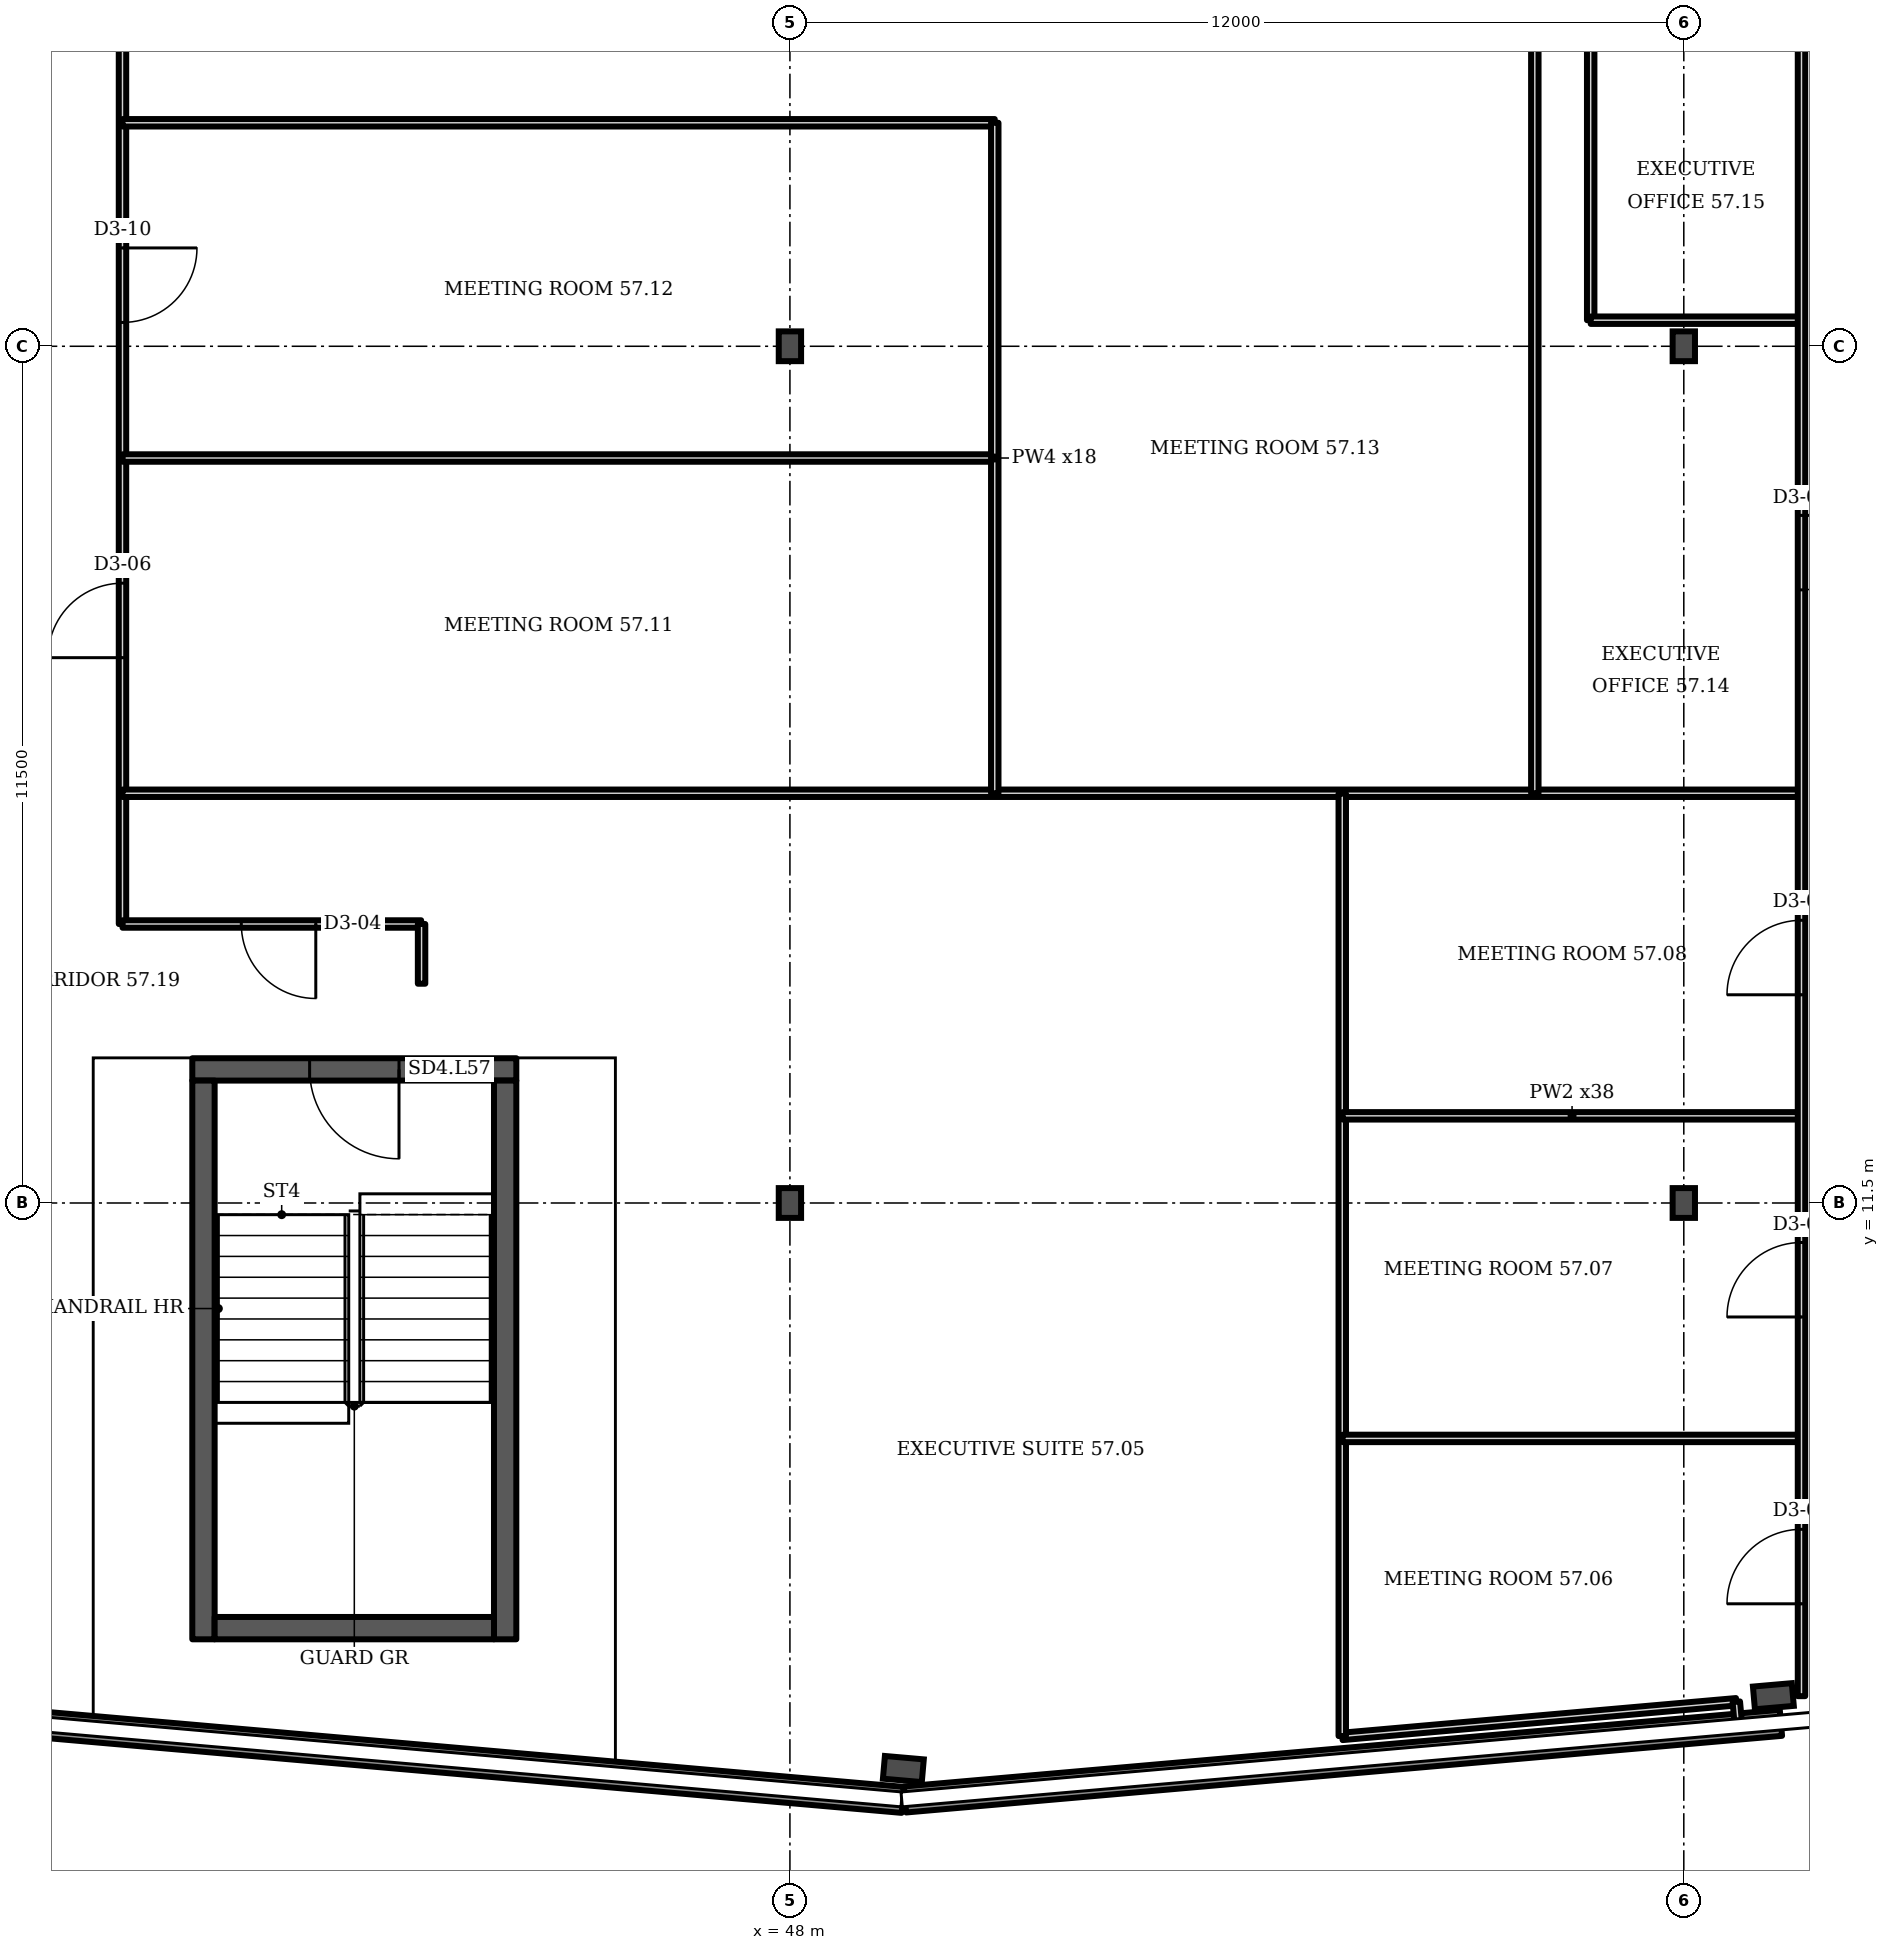
"""IFC4 building model, lengths in metres.
Left out: names, types, materials, properties, quantities, classifications, styles, units other than length and angle.
Written with IfcOpenShell. Run it as: python <this file> out.ifc"""

import sys

from ifc_helpers import new_model, si_unit, direction, frame, frame_2d, origin, origin_2d, place, context, subcontext, project, spatial, rectangle, i_section, extrude, element, fill, save


model = new_model("IFC4")
c1 = context("Model", 3, precision=1e-05, world=origin(), true_north=direction((0.0, 1.0)))
c2 = subcontext(c1, "Body", "Model", "MODEL_VIEW")
j1 = project(units=[si_unit("LENGTHUNIT", "METRE"), si_unit("PLANEANGLEUNIT", "RADIAN")], contexts=[c1])
p1 = place(None, origin())
s1 = spatial("IfcSite", under=j1, at=p1, CompositionType="ELEMENT")
p2 = place(p1, origin())
s2 = spatial("IfcBuilding", under=s1, at=p2, CompositionType="ELEMENT")
p3 = place(p2, frame((0.0, 0.0, 228.7)))
s3 = spatial("IfcBuildingStorey", under=s2, at=p3, CompositionType="ELEMENT", Elevation=228.7)
for number, where, z_axis, x_axis in (
    (1, (49.523, 3.902, 0.0), (0.0, 0.0, 1.0), (-0.087, -0.996, 0.0)),
    (2, (61.202, 4.879, 0.0), (0.0, 0.0, 1.0), (0.087, -0.996, 0.0)),
):
    element("IfcColumn", number, at=place(p3, frame(where, z_axis=z_axis, x_axis=x_axis)), inside=s3, PredefinedType="COLUMN", context=c2, shape_type="SweptSolid", body=[
        extrude(i_section(OverallWidth=0.306, OverallDepth=0.524, WebThickness=0.021, FlangeThickness=0.04, FilletRadius=0.027, at=origin_2d()), origin(), (0.0, 0.0, 1.0), 3.6),
    ])
for number, where, z_axis, x_axis in (
    (3, (48.0, 11.5, 0.0), (0.0, 0.0, 1.0), (1.0, 0.0, 0.0)),
    (4, (60.0, 11.5, 0.0), (0.0, 0.0, 1.0), (1.0, 0.0, 0.0)),
    (5, (48.0, 23.0, 0.0), (0.0, 0.0, 1.0), (1.0, 0.0, 0.0)),
    (6, (60.0, 23.0, 0.0), (0.0, 0.0, 1.0), (1.0, 0.0, 0.0)),
):
    element("IfcColumn", number, at=place(p3, frame(where, z_axis=z_axis, x_axis=x_axis)), inside=s3, PredefinedType="COLUMN", context=c2, shape_type="SweptSolid", body=[
        extrude(i_section(OverallWidth=0.3, OverallDepth=0.4, WebThickness=0.013, FlangeThickness=0.024, FilletRadius=0.027, at=origin_2d()), origin(), (0.0, 0.0, 1.0), 3.6),
    ])
p4 = place(p3, frame((37.729, 4.519, 0.0), z_axis=(0.0, 0.0, 1.0), x_axis=(0.99619, -0.087167, 0.0)))
e7 = element("IfcWall", 7, at=p4, inside=s3, PredefinedType="SOLIDWALL", context=c2, shape_type="SweptSolid", body=[
    extrude(rectangle(XDim=11.831, YDim=0.35, at=frame_2d((5.915, 0.0))), origin(), (0.0, 0.0, 1.0), 1.0),
])
p5 = place(p3, frame((49.545, 3.493, 0.0), z_axis=(0.0, 0.0, 1.0), x_axis=(0.996196, 0.087141, 0.0)))
e8 = element("IfcWall", 8, at=p5, inside=s3, PredefinedType="SOLIDWALL", context=c2, shape_type="SweptSolid", body=[
    extrude(rectangle(XDim=11.803, YDim=0.35, at=frame_2d((5.902, 0.0))), origin(), (0.0, 0.0, 1.0), 1.0),
])
p6 = place(p3, frame((39.977, 13.293, 0.0), z_axis=(0.0, 0.0, 1.0), x_axis=(1.0, 0.0, 0.0)))
e9 = element("IfcWall", 9, at=p6, inside=s3, PredefinedType="SHEAR", context=c2, shape_type="SweptSolid", body=[
    extrude(rectangle(XDim=4.35, YDim=0.3, at=frame_2d((2.175, 0.0))), origin(), (0.0, 0.0, 1.0), 3.2),
])
p7 = place(p6, frame((1.575, 0.0, 0.0)))
e10 = element("IfcOpeningElement", 10, at=p7, cuts=e9, PredefinedType="OPENING", context=c2, shape_type="SweptSolid", body=[
    extrude(rectangle(XDim=1.2, YDim=2.1, at=frame_2d((0.6, 1.05))), frame((0.0, 0.16, 0.0), z_axis=(0.0, -1.0, 0.0), x_axis=(1.0, 0.0, 0.0)), (0.0, 0.0, 1.0), 0.32),
])
p8 = place(p3, frame((39.04, 15.245, 0.0), z_axis=(0.0, 0.0, 1.0), x_axis=(0.0, 1.0, 0.0)))
e11 = element("IfcWall", 11, at=p8, inside=s3, PredefinedType="PARTITIONING", context=c2, shape_type="SweptSolid", body=[
    extrude(rectangle(XDim=15.255, YDim=0.1, at=frame_2d((7.627, 0.0))), origin(), (0.0, 0.0, 1.0), 3.2),
])
p9 = place(p8, frame((3.575, 0.0, 0.0)))
e12 = element("IfcOpeningElement", 12, at=p9, cuts=e11, PredefinedType="OPENING", context=c2, shape_type="SweptSolid", body=[
    extrude(rectangle(XDim=1.0, YDim=2.1, at=frame_2d((0.5, 1.05))), frame((0.0, 0.06, 0.0), z_axis=(0.0, -1.0, 0.0), x_axis=(1.0, 0.0, 0.0)), (0.0, 0.0, 1.0), 0.12),
])
p10 = place(p8, frame((8.075, 0.0, 0.0)))
e13 = element("IfcOpeningElement", 13, at=p10, cuts=e11, PredefinedType="OPENING", context=c2, shape_type="SweptSolid", body=[
    extrude(rectangle(XDim=1.0, YDim=2.1, at=frame_2d((0.5, 1.05))), frame((0.0, 0.06, 0.0), z_axis=(0.0, -1.0, 0.0), x_axis=(1.0, 0.0, 0.0)), (0.0, 0.0, 1.0), 0.12),
])
p11 = place(p3, frame((39.04, 15.245, 0.0), z_axis=(0.0, 0.0, 1.0), x_axis=(1.0, 0.0, 0.0)))
e14 = element("IfcWall", 14, at=p11, inside=s3, PredefinedType="PARTITIONING", context=c2, shape_type="SweptSolid", body=[
    extrude(rectangle(XDim=4.01, YDim=0.1, at=frame_2d((2.005, 0.0))), origin(), (0.0, 0.0, 1.0), 3.2),
])
p12 = place(p11, frame((1.595, 0.0, 0.0)))
e15 = element("IfcOpeningElement", 15, at=p12, cuts=e14, PredefinedType="OPENING", context=c2, shape_type="SweptSolid", body=[
    extrude(rectangle(XDim=1.0, YDim=2.1, at=frame_2d((0.5, 1.05))), frame((0.0, 0.06, 0.0), z_axis=(0.0, -1.0, 0.0), x_axis=(1.0, 0.0, 0.0)), (0.0, 0.0, 1.0), 0.12),
])
p13 = place(p3, frame((39.04, 17.0, 0.0), z_axis=(0.0, 0.0, 1.0), x_axis=(1.0, 0.0, 0.0)))
e16 = element("IfcWall", 16, at=p13, inside=s3, PredefinedType="PARTITIONING", context=c2, shape_type="SweptSolid", body=[
    extrude(rectangle(XDim=22.54, YDim=0.1, at=frame_2d((11.27, 0.0))), origin(), (0.0, 0.0, 1.0), 3.2),
])
for number, where, z_axis, x_axis in (
    (17, (39.04, 21.5, 0.0), (0.0, 0.0, 1.0), (1.0, 0.0, 0.0)),
    (18, (39.04, 26.0, 0.0), (0.0, 0.0, 1.0), (1.0, 0.0, 0.0)),
):
    element("IfcWall", number, at=place(p3, frame(where, z_axis=z_axis, x_axis=x_axis)), inside=s3, PredefinedType="PARTITIONING", context=c2, shape_type="SweptSolid", body=[
        extrude(rectangle(XDim=11.71, YDim=0.1, at=frame_2d((5.855, 0.0))), origin(), (0.0, 0.0, 1.0), 3.2),
    ])
p14 = place(p3, frame((43.055, 14.443, 0.0), z_axis=(0.0, 0.0, 1.0), x_axis=(0.0, 1.0, 0.0)))
e19 = element("IfcWall", 19, at=p14, inside=s3, PredefinedType="PARTITIONING", context=c2, shape_type="SweptSolid", body=[
    extrude(rectangle(XDim=0.802, YDim=0.1, at=frame_2d((0.401, 0.0))), origin(), (0.0, 0.0, 1.0), 3.2),
])
p15 = place(p3, frame((50.75, 17.0, 0.0), z_axis=(0.0, 0.0, 1.0), x_axis=(0.0, 1.0, 0.0)))
e20 = element("IfcWall", 20, at=p15, inside=s3, PredefinedType="PARTITIONING", context=c2, shape_type="SweptSolid", body=[
    extrude(rectangle(XDim=9.0, YDim=0.1, at=frame_2d((4.5, 0.0))), origin(), (0.0, 0.0, 1.0), 3.2),
])
p16 = place(p3, frame((55.415, 4.34, 0.0), z_axis=(0.0, 0.0, 1.0), x_axis=(0.996159, 0.087534, 0.0)))
e21 = element("IfcWall", 21, at=p16, inside=s3, PredefinedType="PARTITIONING", context=c2, shape_type="SweptSolid", body=[
    extrude(rectangle(XDim=5.31, YDim=0.1, at=frame_2d((2.655, 0.0))), origin(), (0.0, 0.0, 1.0), 2.58),
])
p17 = place(p3, frame((55.415, 4.345, 0.0), z_axis=(0.0, 0.0, 1.0), x_axis=(0.0, 1.0, 0.0)))
e22 = element("IfcWall", 22, at=p17, inside=s3, PredefinedType="PARTITIONING", context=c2, shape_type="SweptSolid", body=[
    extrude(rectangle(XDim=12.65, YDim=0.1, at=frame_2d((6.325, 0.0))), origin(), (0.0, 0.0, 1.0), 3.2),
])
for number, where, z_axis, x_axis in (
    (23, (55.42, 8.34, 0.0), (0.0, 0.0, 1.0), (1.0, 0.0, 0.0)),
    (24, (55.42, 12.67, 0.0), (0.0, 0.0, 1.0), (1.0, 0.0, 0.0)),
):
    element("IfcWall", number, at=place(p3, frame(where, z_axis=z_axis, x_axis=x_axis)), inside=s3, PredefinedType="PARTITIONING", context=c2, shape_type="SweptSolid", body=[
        extrude(rectangle(XDim=6.16, YDim=0.1, at=frame_2d((3.08, 0.0))), origin(), (0.0, 0.0, 1.0), 3.2),
    ])
p18 = place(p3, frame((58.0, 17.0, 0.0), z_axis=(0.0, 0.0, 1.0), x_axis=(0.0, 1.0, 0.0)))
e25 = element("IfcWall", 25, at=p18, inside=s3, PredefinedType="PARTITIONING", context=c2, shape_type="SweptSolid", body=[
    extrude(rectangle(XDim=13.5, YDim=0.1, at=frame_2d((6.75, 0.0))), origin(), (0.0, 0.0, 1.0), 3.2),
])
p19 = place(p3, frame((58.75, 23.35, 0.0), z_axis=(0.0, 0.0, 1.0), x_axis=(0.0, 1.0, 0.0)))
e26 = element("IfcWall", 26, at=p19, inside=s3, PredefinedType="PARTITIONING", context=c2, shape_type="SweptSolid", body=[
    extrude(rectangle(XDim=6.35, YDim=0.1, at=frame_2d((3.175, 0.0))), origin(), (0.0, 0.0, 1.0), 3.2),
])
p20 = place(p3, frame((58.75, 23.35, 0.0), z_axis=(0.0, 0.0, 1.0), x_axis=(1.0, 0.0, 0.0)))
e27 = element("IfcWall", 27, at=p20, inside=s3, PredefinedType="PARTITIONING", context=c2, shape_type="SweptSolid", body=[
    extrude(rectangle(XDim=2.83, YDim=0.1, at=frame_2d((1.415, 0.0))), origin(), (0.0, 0.0, 1.0), 3.2),
])
p21 = place(p3, frame((60.733, 4.497, 0.0), z_axis=(0.0, 0.0, 1.0), x_axis=(-0.090037, 0.995936, 0.0)))
e28 = element("IfcWall", 28, at=p21, inside=s3, PredefinedType="PARTITIONING", context=c2, shape_type="SweptSolid", body=[
    extrude(rectangle(XDim=0.309, YDim=0.1, at=frame_2d((0.155, 0.0))), origin(), (0.0, 0.0, 1.0), 3.2),
])
p22 = place(p3, frame((61.58, 4.88, 0.0), z_axis=(0.0, 0.0, 1.0), x_axis=(0.0, 1.0, 0.0)))
e29 = element("IfcWall", 29, at=p22, inside=s3, PredefinedType="PARTITIONING", context=c2, shape_type="SweptSolid", body=[
    extrude(rectangle(XDim=24.82, YDim=0.1, at=frame_2d((12.41, 0.0))), origin(), (0.0, 0.0, 1.0), 3.2),
])
p23 = place(p22, frame((1.24, 0.0, 0.0)))
e30 = element("IfcOpeningElement", 30, at=p23, cuts=e29, PredefinedType="OPENING", context=c2, shape_type="SweptSolid", body=[
    extrude(rectangle(XDim=1.0, YDim=2.1, at=frame_2d((0.5, 1.05))), frame((0.0, 0.06, 0.0), z_axis=(0.0, -1.0, 0.0), x_axis=(1.0, 0.0, 0.0)), (0.0, 0.0, 1.0), 0.12),
])
p24 = place(p22, frame((5.09, 0.0, 0.0)))
e31 = element("IfcOpeningElement", 31, at=p24, cuts=e29, PredefinedType="OPENING", context=c2, shape_type="SweptSolid", body=[
    extrude(rectangle(XDim=1.0, YDim=2.1, at=frame_2d((0.5, 1.05))), frame((0.0, 0.06, 0.0), z_axis=(0.0, -1.0, 0.0), x_axis=(1.0, 0.0, 0.0)), (0.0, 0.0, 1.0), 0.12),
])
p25 = place(p22, frame((9.415, 0.0, 0.0)))
e32 = element("IfcOpeningElement", 32, at=p25, cuts=e29, PredefinedType="OPENING", context=c2, shape_type="SweptSolid", body=[
    extrude(rectangle(XDim=1.0, YDim=2.1, at=frame_2d((0.5, 1.05))), frame((0.0, 0.06, 0.0), z_axis=(0.0, -1.0, 0.0), x_axis=(1.0, 0.0, 0.0)), (0.0, 0.0, 1.0), 0.12),
])
p26 = place(p22, frame((14.85, 0.0, 0.0)))
e33 = element("IfcOpeningElement", 33, at=p26, cuts=e29, PredefinedType="OPENING", context=c2, shape_type="SweptSolid", body=[
    extrude(rectangle(XDim=1.0, YDim=2.1, at=frame_2d((0.5, 1.05))), frame((0.0, 0.06, 0.0), z_axis=(0.0, -1.0, 0.0), x_axis=(1.0, 0.0, 0.0)), (0.0, 0.0, 1.0), 0.12),
])
p27 = place(p22, frame((22.63, 0.0, 0.0)))
e34 = element("IfcOpeningElement", 34, at=p27, cuts=e29, PredefinedType="OPENING", context=c2, shape_type="SweptSolid", body=[
    extrude(rectangle(XDim=1.0, YDim=2.1, at=frame_2d((0.5, 1.05))), frame((0.0, 0.06, 0.0), z_axis=(0.0, -1.0, 0.0), x_axis=(1.0, 0.0, 0.0)), (0.0, 0.0, 1.0), 0.12),
])
for number, where, z_axis, x_axis in (
    (35, (40.127, 5.643, 0.0), (0.0, 0.0, 1.0), (0.0, 1.0, 0.0)),
    (36, (44.177, 5.643, 0.0), (0.0, 0.0, 1.0), (0.0, 1.0, 0.0)),
):
    element("IfcWall", number, at=place(p3, frame(where, z_axis=z_axis, x_axis=x_axis)), inside=s3, PredefinedType="SHEAR", context=c2, shape_type="SweptSolid", body=[
        extrude(rectangle(XDim=7.5, YDim=0.3, at=frame_2d((3.75, 0.0))), origin(), (0.0, 0.0, 1.0), 3.2),
    ])
p28 = place(p3, frame((40.277, 5.793, 0.0), z_axis=(0.0, 0.0, 1.0), x_axis=(1.0, 0.0, 0.0)))
e37 = element("IfcWall", 37, at=p28, inside=s3, PredefinedType="SHEAR", context=c2, shape_type="SweptSolid", body=[
    extrude(rectangle(XDim=3.75, YDim=0.3, at=frame_2d((1.875, 0.0))), origin(), (0.0, 0.0, 1.0), 3.2),
])
p29 = place(p7, origin())
e38 = element("IfcDoor", 38, at=p29, inside=s3, OperationType="SINGLE_SWING_RIGHT", PredefinedType="DOOR", context=c2, shape_type="SweptSolid", body=[
    extrude(rectangle(XDim=1.2, YDim=2.1, at=frame_2d((0.6, 1.05))), frame((0.0, 0.025, 0.0), z_axis=(0.0, -1.0, 0.0), x_axis=(1.0, 0.0, 0.0)), (0.0, 0.0, 1.0), 0.05),
])
fill(e10, e38)
p30 = place(p23, origin())
e39 = element("IfcDoor", 39, at=p30, inside=s3, OperationType="SINGLE_SWING_LEFT", PredefinedType="DOOR", context=c2, shape_type="SweptSolid", body=[
    extrude(rectangle(XDim=1.0, YDim=2.1, at=frame_2d((0.5, 1.05))), frame((0.0, 0.025, 0.0), z_axis=(0.0, -1.0, 0.0), x_axis=(1.0, 0.0, 0.0)), (0.0, 0.0, 1.0), 0.05),
])
fill(e30, e39)
p31 = place(p24, origin())
e40 = element("IfcDoor", 40, at=p31, inside=s3, OperationType="SINGLE_SWING_LEFT", PredefinedType="DOOR", context=c2, shape_type="SweptSolid", body=[
    extrude(rectangle(XDim=1.0, YDim=2.1, at=frame_2d((0.5, 1.05))), frame((0.0, 0.025, 0.0), z_axis=(0.0, -1.0, 0.0), x_axis=(1.0, 0.0, 0.0)), (0.0, 0.0, 1.0), 0.05),
])
fill(e31, e40)
p32 = place(p25, origin())
e41 = element("IfcDoor", 41, at=p32, inside=s3, OperationType="SINGLE_SWING_LEFT", PredefinedType="DOOR", context=c2, shape_type="SweptSolid", body=[
    extrude(rectangle(XDim=1.0, YDim=2.1, at=frame_2d((0.5, 1.05))), frame((0.0, 0.025, 0.0), z_axis=(0.0, -1.0, 0.0), x_axis=(1.0, 0.0, 0.0)), (0.0, 0.0, 1.0), 0.05),
])
fill(e32, e41)
p33 = place(p12, origin())
e42 = element("IfcDoor", 42, at=p33, inside=s3, OperationType="SINGLE_SWING_RIGHT", PredefinedType="DOOR", context=c2, shape_type="SweptSolid", body=[
    extrude(rectangle(XDim=1.0, YDim=2.1, at=frame_2d((0.5, 1.05))), frame((0.0, 0.025, 0.0), z_axis=(0.0, -1.0, 0.0), x_axis=(1.0, 0.0, 0.0)), (0.0, 0.0, 1.0), 0.05),
])
fill(e15, e42)
p34 = place(p9, origin())
e43 = element("IfcDoor", 43, at=p34, inside=s3, OperationType="SINGLE_SWING_LEFT", PredefinedType="DOOR", context=c2, shape_type="SweptSolid", body=[
    extrude(rectangle(XDim=1.0, YDim=2.1, at=frame_2d((0.5, 1.05))), frame((0.0, 0.025, 0.0), z_axis=(0.0, -1.0, 0.0), x_axis=(1.0, 0.0, 0.0)), (0.0, 0.0, 1.0), 0.05),
])
fill(e12, e43)
p35 = place(p26, origin())
e44 = element("IfcDoor", 44, at=p35, inside=s3, OperationType="SINGLE_SWING_RIGHT", PredefinedType="DOOR", context=c2, shape_type="SweptSolid", body=[
    extrude(rectangle(XDim=1.0, YDim=2.1, at=frame_2d((0.5, 1.05))), frame((0.0, 0.025, 0.0), z_axis=(0.0, -1.0, 0.0), x_axis=(1.0, 0.0, 0.0)), (0.0, 0.0, 1.0), 0.05),
])
fill(e33, e44)
p36 = place(p10, origin())
e45 = element("IfcDoor", 45, at=p36, inside=s3, OperationType="SINGLE_SWING_RIGHT", PredefinedType="DOOR", context=c2, shape_type="SweptSolid", body=[
    extrude(rectangle(XDim=1.0, YDim=2.1, at=frame_2d((0.5, 1.05))), frame((0.0, 0.025, 0.0), z_axis=(0.0, -1.0, 0.0), x_axis=(1.0, 0.0, 0.0)), (0.0, 0.0, 1.0), 0.05),
])
fill(e13, e45)
save(model, sys.argv[1])
